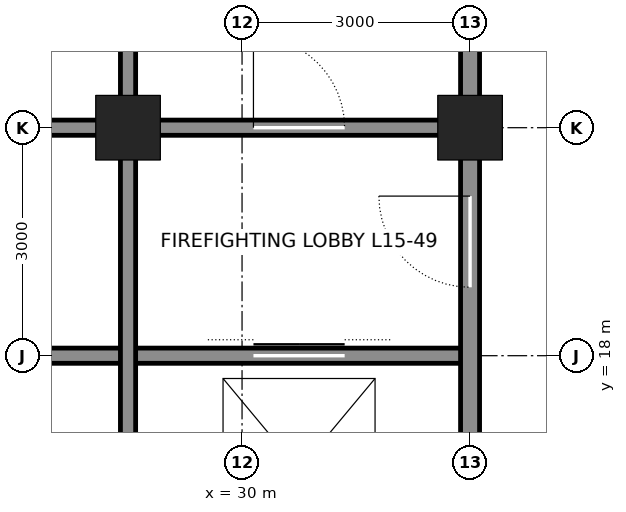
"""IFC4 building model, lengths in metres.
Left out: names, types, materials, properties, quantities, classifications, styles, units other than length and angle.
Written with IfcOpenShell. Run it as: python <this file> out.ifc"""

import sys

from ifc_helpers import new_model, si_unit, direction, frame, frame_2d, origin, origin_2d, place, context, subcontext, project, spatial, rectangle, hollow_rectangle, extrude, element, fill, save


model = new_model("IFC4")
c1 = context("Model", 3, precision=1e-05, world=origin(), true_north=direction((0.0, 1.0)))
c2 = subcontext(c1, "Body", "Model", "MODEL_VIEW")
j1 = project(units=[si_unit("LENGTHUNIT", "METRE"), si_unit("PLANEANGLEUNIT", "RADIAN")], contexts=[c1])
p1 = place(None, origin())
s1 = spatial("IfcSite", under=j1, at=p1, CompositionType="ELEMENT")
p2 = place(p1, origin())
s2 = spatial("IfcBuilding", under=s1, at=p2, CompositionType="ELEMENT")
p3 = place(p2, frame((0.0, 0.0, 73.8)))
s3 = spatial("IfcBuildingStorey", under=s2, at=p3, CompositionType="ELEMENT", Elevation=73.8)
for number, where, z_axis, x_axis in (
    (1, (33.0, 21.0, 0.0), (0.0, 0.0, 1.0), (1.0, 0.0, 0.0)),
    (2, (28.5, 21.0, 0.0), (0.0, 0.0, 1.0), (1.0, 0.0, 0.0)),
):
    element("IfcColumn", number, at=place(p3, frame(where, z_axis=z_axis, x_axis=x_axis)), inside=s3, PredefinedType="COLUMN", context=c2, shape_type="SweptSolid", body=[
        extrude(hollow_rectangle(XDim=0.85, YDim=0.85, WallThickness=0.085, at=origin_2d()), origin(), (0.0, 0.0, 1.0), 4.5),
    ])
p4 = place(p3, frame((25.5, 18.0, 0.0), z_axis=(0.0, 0.0, 1.0), x_axis=(1.0, 0.0, 0.0)))
e3 = element("IfcWall", 3, at=p4, inside=s3, PredefinedType="SOLIDWALL", context=c2, shape_type="SweptSolid", body=[
    extrude(rectangle(XDim=7.5, YDim=0.2, at=frame_2d((3.75, 0.0))), origin(), (0.0, 0.0, 1.0), 4.34),
])
p5 = place(p4, frame((4.65, 0.0, 0.0)))
e4 = element("IfcOpeningElement", 4, at=p5, cuts=e3, PredefinedType="OPENING", context=c2, shape_type="SweptSolid", body=[
    extrude(rectangle(XDim=1.2, YDim=2.1, at=frame_2d((0.6, 1.05))), frame((0.0, 0.11, 0.0), z_axis=(0.0, -1.0, 0.0), x_axis=(1.0, 0.0, 0.0)), (0.0, 0.0, 1.0), 0.22),
])
p6 = place(p3, frame((25.5, 21.0, 0.0), z_axis=(0.0, 0.0, 1.0), x_axis=(1.0, 0.0, 0.0)))
e5 = element("IfcWall", 5, at=p6, inside=s3, PredefinedType="SOLIDWALL", context=c2, shape_type="SweptSolid", body=[
    extrude(rectangle(XDim=2.75, YDim=0.2, at=frame_2d((1.375, 0.0))), origin(), (0.0, 0.0, 1.0), 3.39),
])
p7 = place(p3, frame((28.75, 21.0, 0.0), z_axis=(0.0, 0.0, 1.0), x_axis=(1.0, 0.0, 0.0)))
e6 = element("IfcWall", 6, at=p7, inside=s3, PredefinedType="SOLIDWALL", context=c2, shape_type="SweptSolid", body=[
    extrude(rectangle(XDim=4.0, YDim=0.2, at=frame_2d((2.0, 0.0))), origin(), (0.0, 0.0, 1.0), 3.39),
])
p8 = place(p7, frame((1.4, 0.0, 0.0)))
e7 = element("IfcOpeningElement", 7, at=p8, cuts=e6, PredefinedType="OPENING", context=c2, shape_type="SweptSolid", body=[
    extrude(rectangle(XDim=1.2, YDim=2.1, at=frame_2d((0.6, 1.05))), frame((0.0, 0.11, 0.0), z_axis=(0.0, -1.0, 0.0), x_axis=(1.0, 0.0, 0.0)), (0.0, 0.0, 1.0), 0.22),
])
p9 = place(p3, frame((28.5, 12.25, 0.0), z_axis=(0.0, 0.0, 1.0), x_axis=(0.0, 1.0, 0.0)))
e8 = element("IfcWall", 8, at=p9, inside=s3, PredefinedType="SOLIDWALL", context=c2, shape_type="SweptSolid", body=[
    extrude(rectangle(XDim=8.5, YDim=0.2, at=frame_2d((4.25, 0.0))), origin(), (0.0, 0.0, 1.0), 3.413),
])
p10 = place(p3, frame((28.5, 21.25, 0.0), z_axis=(0.0, 0.0, 1.0), x_axis=(0.0, 1.0, 0.0)))
e9 = element("IfcWall", 9, at=p10, inside=s3, PredefinedType="SOLIDWALL", context=c2, shape_type="SweptSolid", body=[
    extrude(rectangle(XDim=2.5, YDim=0.2, at=frame_2d((1.25, 0.0))), origin(), (0.0, 0.0, 1.0), 3.413),
])
p11 = place(p3, frame((33.0, 12.25, 0.0), z_axis=(0.0, 0.0, 1.0), x_axis=(0.0, 1.0, 0.0)))
e10 = element("IfcWall", 10, at=p11, inside=s3, PredefinedType="SOLIDWALL", context=c2, shape_type="SweptSolid", body=[
    extrude(rectangle(XDim=8.5, YDim=0.25, at=frame_2d((4.25, 0.0))), origin(), (0.0, 0.0, 1.0), 3.113),
])
p12 = place(p11, frame((6.65, 0.0, 0.0)))
e11 = element("IfcOpeningElement", 11, at=p12, cuts=e10, PredefinedType="OPENING", context=c2, shape_type="SweptSolid", body=[
    extrude(rectangle(XDim=1.2, YDim=2.1, at=frame_2d((0.6, 1.05))), frame((0.0, 0.135, 0.0), z_axis=(0.0, -1.0, 0.0), x_axis=(1.0, 0.0, 0.0)), (0.0, 0.0, 1.0), 0.27),
])
p13 = place(p11, frame((0.875, 0.0, 0.0)))
e12 = element("IfcOpeningElement", 12, at=p13, cuts=e10, PredefinedType="OPENING", context=c2, shape_type="SweptSolid", body=[
    extrude(rectangle(XDim=0.75, YDim=2.1, at=frame_2d((0.375, 1.05))), frame((0.0, 0.135, 0.0), z_axis=(0.0, -1.0, 0.0), x_axis=(1.0, 0.0, 0.0)), (0.0, 0.0, 1.0), 0.27),
])
p14 = place(p3, frame((33.0, 21.25, 0.0), z_axis=(0.0, 0.0, 1.0), x_axis=(0.0, 1.0, 0.0)))
e13 = element("IfcWall", 13, at=p14, inside=s3, PredefinedType="SOLIDWALL", context=c2, shape_type="SweptSolid", body=[
    extrude(rectangle(XDim=2.5, YDim=0.25, at=frame_2d((1.25, 0.0))), origin(), (0.0, 0.0, 1.0), 3.113),
])
p15 = place(p8, origin())
e14 = element("IfcDoor", 14, at=p15, inside=s3, OperationType="SINGLE_SWING_LEFT", PredefinedType="DOOR", context=c2, shape_type="SweptSolid", body=[
    extrude(rectangle(XDim=1.2, YDim=2.1, at=frame_2d((0.6, 1.05))), frame((0.0, 0.025, 0.0), z_axis=(0.0, -1.0, 0.0), x_axis=(1.0, 0.0, 0.0)), (0.0, 0.0, 1.0), 0.05),
])
fill(e7, e14)
p16 = place(p12, origin())
e15 = element("IfcDoor", 15, at=p16, inside=s3, OperationType="SINGLE_SWING_RIGHT", PredefinedType="DOOR", context=c2, shape_type="SweptSolid", body=[
    extrude(rectangle(XDim=1.2, YDim=2.1, at=frame_2d((0.6, 1.05))), frame((0.0, 0.025, 0.0), z_axis=(0.0, -1.0, 0.0), x_axis=(1.0, 0.0, 0.0)), (0.0, 0.0, 1.0), 0.05),
])
fill(e11, e15)
p17 = place(p5, origin())
e16 = element("IfcDoor", 16, at=p17, inside=s3, OperationType="DOUBLE_DOOR_SLIDING", PredefinedType="DOOR", context=c2, shape_type="SweptSolid", body=[
    extrude(rectangle(XDim=1.2, YDim=2.1, at=frame_2d((0.6, 1.05))), frame((0.0, 0.025, 0.0), z_axis=(0.0, -1.0, 0.0), x_axis=(1.0, 0.0, 0.0)), (0.0, 0.0, 1.0), 0.05),
])
fill(e4, e16)
save(model, sys.argv[1])
